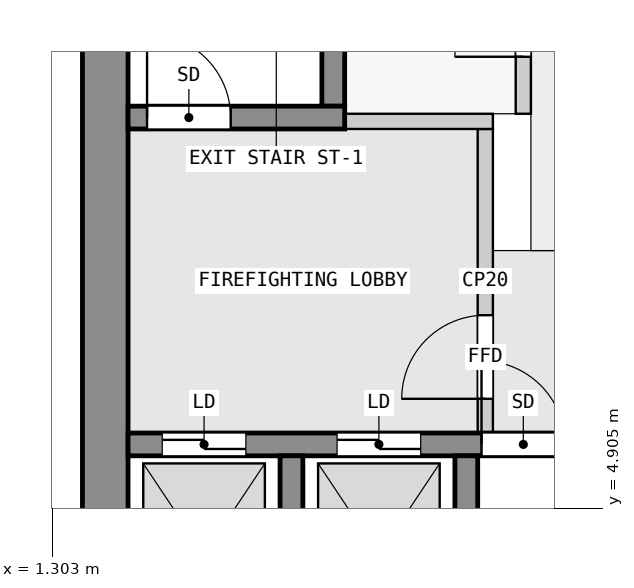
"""IFC4 building model, lengths in metres.
Left out: names, types, materials, properties, quantities, classifications, styles, units other than length and angle.
Written with IfcOpenShell. Run it as: python <this file> out.ifc"""

import sys

from ifc_helpers import new_model, si_unit, direction, frame, frame_2d, origin, place, context, subcontext, project, spatial, rectangle, extrude, element, fill, save


model = new_model("IFC4")
c1 = context("Model", 3, precision=1e-05, world=origin(), true_north=direction((0.0, 1.0)))
c2 = subcontext(c1, "Body", "Model", "MODEL_VIEW")
j1 = project(units=[si_unit("LENGTHUNIT", "METRE"), si_unit("PLANEANGLEUNIT", "RADIAN")], contexts=[c1])
p1 = place(None, origin())
s1 = spatial("IfcSite", under=j1, at=p1, CompositionType="ELEMENT")
p2 = place(p1, origin())
s2 = spatial("IfcBuilding", under=s1, at=p2, CompositionType="ELEMENT")
p3 = place(p2, frame((0.0, 0.0, 139.4)))
s3 = spatial("IfcBuildingStorey", under=s2, at=p3, CompositionType="ELEMENT", Elevation=139.4)
p4 = place(p3, frame((2.0, 2.5, 0.0), z_axis=(0.0, 0.0, 1.0), x_axis=(0.0, 1.0, 0.0)))
e1 = element("IfcWall", 1, at=p4, inside=s3, PredefinedType="SHEAR", context=c2, shape_type="SweptSolid", body=[
    extrude(rectangle(XDim=14.9, YDim=0.6, at=frame_2d((7.45, 0.0))), origin(), (0.0, 0.0, 1.0), 3.25),
])
for number, where, z_axis, x_axis in (
    (2, (4.45, 2.8, 0.0), (0.0, 0.0, 1.0), (0.0, 1.0, 0.0)),
    (3, (6.75, 2.8, 0.0), (0.0, 0.0, 1.0), (0.0, 1.0, 0.0)),
):
    element("IfcWall", number, at=place(p3, frame(where, z_axis=z_axis, x_axis=x_axis)), inside=s3, PredefinedType="SHEAR", context=c2, shape_type="SweptSolid", body=[
        extrude(rectangle(XDim=2.8, YDim=0.3, at=frame_2d((1.4, 0.0))), origin(), (0.0, 0.0, 1.0), 3.25),
    ])
p5 = place(p3, frame((2.3, 5.75, 0.0), z_axis=(0.0, 0.0, 1.0), x_axis=(1.0, 0.0, 0.0)))
e4 = element("IfcWall", 4, at=p5, inside=s3, PredefinedType="SHEAR", context=c2, shape_type="SweptSolid", body=[
    extrude(rectangle(XDim=18.8, YDim=0.3, at=frame_2d((9.4, 0.0))), origin(), (0.0, 0.0, 1.0), 3.25),
])
p6 = place(p5, frame((4.65, 0.0, 0.0)))
e5 = element("IfcOpeningElement", 5, at=p6, cuts=e4, PredefinedType="OPENING", context=c2, shape_type="SweptSolid", body=[
    extrude(rectangle(XDim=1.1, YDim=2.1, at=frame_2d((0.55, 1.05))), frame((0.0, 0.16, 0.0), z_axis=(0.0, -1.0, 0.0), x_axis=(1.0, 0.0, 0.0)), (0.0, 0.0, 1.0), 0.32),
])
p7 = place(p5, frame((0.45, 0.0, 0.0)))
e6 = element("IfcOpeningElement", 6, at=p7, cuts=e4, PredefinedType="OPENING", context=c2, shape_type="SweptSolid", body=[
    extrude(rectangle(XDim=1.1, YDim=2.1, at=frame_2d((0.55, 1.05))), frame((0.0, 0.16, 0.0), z_axis=(0.0, -1.0, 0.0), x_axis=(1.0, 0.0, 0.0)), (0.0, 0.0, 1.0), 0.32),
])
p8 = place(p5, frame((2.75, 0.0, 0.0)))
e7 = element("IfcOpeningElement", 7, at=p8, cuts=e4, PredefinedType="OPENING", context=c2, shape_type="SweptSolid", body=[
    extrude(rectangle(XDim=1.1, YDim=2.1, at=frame_2d((0.55, 1.05))), frame((0.0, 0.16, 0.0), z_axis=(0.0, -1.0, 0.0), x_axis=(1.0, 0.0, 0.0)), (0.0, 0.0, 1.0), 0.32),
])
p9 = place(p5, frame((13.2, 0.0, 0.0)))
e8 = element("IfcOpeningElement", 8, at=p9, cuts=e4, PredefinedType="OPENING", context=c2, shape_type="SweptSolid", body=[
    extrude(rectangle(XDim=0.9, YDim=2.1, at=frame_2d((0.45, 1.05))), frame((0.0, 0.16, 0.0), z_axis=(0.0, -1.0, 0.0), x_axis=(1.0, 0.0, 0.0)), (0.0, 0.0, 1.0), 0.32),
])
p10 = place(p5, frame((16.95, 0.0, 0.0)))
e9 = element("IfcOpeningElement", 9, at=p10, cuts=e4, PredefinedType="OPENING", context=c2, shape_type="SweptSolid", body=[
    extrude(rectangle(XDim=0.9, YDim=2.1, at=frame_2d((0.45, 1.05))), frame((0.0, 0.16, 0.0), z_axis=(0.0, -1.0, 0.0), x_axis=(1.0, 0.0, 0.0)), (0.0, 0.0, 1.0), 0.32),
])
p11 = place(p3, frame((2.3, 10.05, 0.0), z_axis=(0.0, 0.0, 1.0), x_axis=(1.0, 0.0, 0.0)))
e10 = element("IfcWall", 10, at=p11, inside=s3, PredefinedType="SHEAR", context=c2, shape_type="SweptSolid", body=[
    extrude(rectangle(XDim=2.85, YDim=0.3, at=frame_2d((1.425, 0.0))), origin(), (0.0, 0.0, 1.0), 3.25),
])
p12 = place(p11, frame((0.25, 0.0, 0.0)))
e11 = element("IfcOpeningElement", 11, at=p12, cuts=e10, PredefinedType="OPENING", context=c2, shape_type="SweptSolid", body=[
    extrude(rectangle(XDim=1.1, YDim=2.1, at=frame_2d((0.55, 1.05))), frame((0.0, 0.16, 0.0), z_axis=(0.0, -1.0, 0.0), x_axis=(1.0, 0.0, 0.0)), (0.0, 0.0, 1.0), 0.32),
])
p13 = place(p3, frame((5.0, 10.2, 0.0), z_axis=(0.0, 0.0, 1.0), x_axis=(0.0, 1.0, 0.0)))
e12 = element("IfcWall", 12, at=p13, inside=s3, PredefinedType="SHEAR", context=c2, shape_type="SweptSolid", body=[
    extrude(rectangle(XDim=6.4, YDim=0.3, at=frame_2d((3.2, 0.0))), origin(), (0.0, 0.0, 1.0), 3.25),
])
p14 = place(p3, frame((7.0, 5.9, 0.0), z_axis=(0.0, 0.0, 1.0), x_axis=(0.0, 1.0, 0.0)))
e13 = element("IfcWall", 13, at=p14, inside=s3, PredefinedType="PARTITIONING", context=c2, shape_type="SweptSolid", body=[
    extrude(rectangle(XDim=4.0, YDim=0.2, at=frame_2d((2.0, 0.0))), origin(), (0.0, 0.0, 1.0), 3.25),
])
p15 = place(p14, frame((0.45, 0.0, 0.0)))
e14 = element("IfcOpeningElement", 14, at=p15, cuts=e13, PredefinedType="OPENING", context=c2, shape_type="SweptSolid", body=[
    extrude(rectangle(XDim=1.1, YDim=2.1, at=frame_2d((0.55, 1.05))), frame((0.0, 0.11, 0.0), z_axis=(0.0, -1.0, 0.0), x_axis=(1.0, 0.0, 0.0)), (0.0, 0.0, 1.0), 0.22),
])
p16 = place(p3, frame((5.15, 10.0, 0.0), z_axis=(0.0, 0.0, 1.0), x_axis=(1.0, 0.0, 0.0)))
e15 = element("IfcWall", 15, at=p16, inside=s3, PredefinedType="PARTITIONING", context=c2, shape_type="SweptSolid", body=[
    extrude(rectangle(XDim=1.95, YDim=0.2, at=frame_2d((0.975, 0.0))), origin(), (0.0, 0.0, 1.0), 3.25),
])
p17 = place(p3, frame((7.5, 10.1, 0.0), z_axis=(0.0, 0.0, 1.0), x_axis=(0.0, 1.0, 0.0)))
e16 = element("IfcWall", 16, at=p17, inside=s3, PredefinedType="PARTITIONING", context=c2, shape_type="SweptSolid", body=[
    extrude(rectangle(XDim=7.3, YDim=0.2, at=frame_2d((3.65, 0.0))), origin(), (0.0, 0.0, 1.0), 3.25),
])
p18 = place(p17, frame((0.75, 0.0, 0.0)))
e17 = element("IfcOpeningElement", 17, at=p18, cuts=e16, PredefinedType="OPENING", context=c2, shape_type="SweptSolid", body=[
    extrude(rectangle(XDim=0.9, YDim=2.1, at=frame_2d((0.45, 1.05))), frame((0.0, 0.11, 0.0), z_axis=(0.0, -1.0, 0.0), x_axis=(1.0, 0.0, 0.0)), (0.0, 0.0, 1.0), 0.22),
])
p19 = place(p17, frame((4.4, 0.0, 0.0)))
e18 = element("IfcOpeningElement", 18, at=p19, cuts=e16, PredefinedType="OPENING", context=c2, shape_type="SweptSolid", body=[
    extrude(rectangle(XDim=0.9, YDim=2.1, at=frame_2d((0.45, 1.05))), frame((0.0, 0.11, 0.0), z_axis=(0.0, -1.0, 0.0), x_axis=(1.0, 0.0, 0.0)), (0.0, 0.0, 1.0), 0.22),
])
p20 = place(p15, origin())
e19 = element("IfcDoor", 19, at=p20, inside=s3, OperationType="SINGLE_SWING_LEFT", PredefinedType="DOOR", context=c2, shape_type="SweptSolid", body=[
    extrude(rectangle(XDim=1.1, YDim=2.1, at=frame_2d((0.55, 1.05))), frame((0.0, 0.025, 0.0), z_axis=(0.0, -1.0, 0.0), x_axis=(1.0, 0.0, 0.0)), (0.0, 0.0, 1.0), 0.05),
])
fill(e14, e19)
p21 = place(p12, origin())
e20 = element("IfcDoor", 20, at=p21, inside=s3, OperationType="SINGLE_SWING_RIGHT", PredefinedType="DOOR", context=c2, shape_type="SweptSolid", body=[
    extrude(rectangle(XDim=1.1, YDim=2.1, at=frame_2d((0.55, 1.05))), frame((0.0, 0.025, 0.0), z_axis=(0.0, -1.0, 0.0), x_axis=(1.0, 0.0, 0.0)), (0.0, 0.0, 1.0), 0.05),
])
fill(e11, e20)
p22 = place(p6, origin())
e21 = element("IfcDoor", 21, at=p22, inside=s3, OperationType="SINGLE_SWING_LEFT", PredefinedType="DOOR", context=c2, shape_type="SweptSolid", body=[
    extrude(rectangle(XDim=1.1, YDim=2.1, at=frame_2d((0.55, 1.05))), frame((0.0, 0.025, 0.0), z_axis=(0.0, -1.0, 0.0), x_axis=(1.0, 0.0, 0.0)), (0.0, 0.0, 1.0), 0.05),
])
fill(e5, e21)
p23 = place(p7, origin())
e22 = element("IfcDoor", 22, at=p23, inside=s3, OperationType="DOUBLE_DOOR_SLIDING", PredefinedType="DOOR", context=c2, shape_type="SweptSolid", body=[
    extrude(rectangle(XDim=1.1, YDim=2.1, at=frame_2d((0.55, 1.05))), frame((0.0, 0.025, 0.0), z_axis=(0.0, -1.0, 0.0), x_axis=(1.0, 0.0, 0.0)), (0.0, 0.0, 1.0), 0.05),
])
fill(e6, e22)
p24 = place(p8, origin())
e23 = element("IfcDoor", 23, at=p24, inside=s3, OperationType="DOUBLE_DOOR_SLIDING", PredefinedType="DOOR", context=c2, shape_type="SweptSolid", body=[
    extrude(rectangle(XDim=1.1, YDim=2.1, at=frame_2d((0.55, 1.05))), frame((0.0, 0.025, 0.0), z_axis=(0.0, -1.0, 0.0), x_axis=(1.0, 0.0, 0.0)), (0.0, 0.0, 1.0), 0.05),
])
fill(e7, e23)
p25 = place(p18, origin())
e24 = element("IfcDoor", 24, at=p25, inside=s3, OperationType="SINGLE_SWING_RIGHT", PredefinedType="DOOR", context=c2, shape_type="SweptSolid", body=[
    extrude(rectangle(XDim=0.9, YDim=2.1, at=frame_2d((0.45, 1.05))), frame((0.0, 0.025, 0.0), z_axis=(0.0, -1.0, 0.0), x_axis=(1.0, 0.0, 0.0)), (0.0, 0.0, 1.0), 0.05),
])
fill(e17, e24)
save(model, sys.argv[1])
